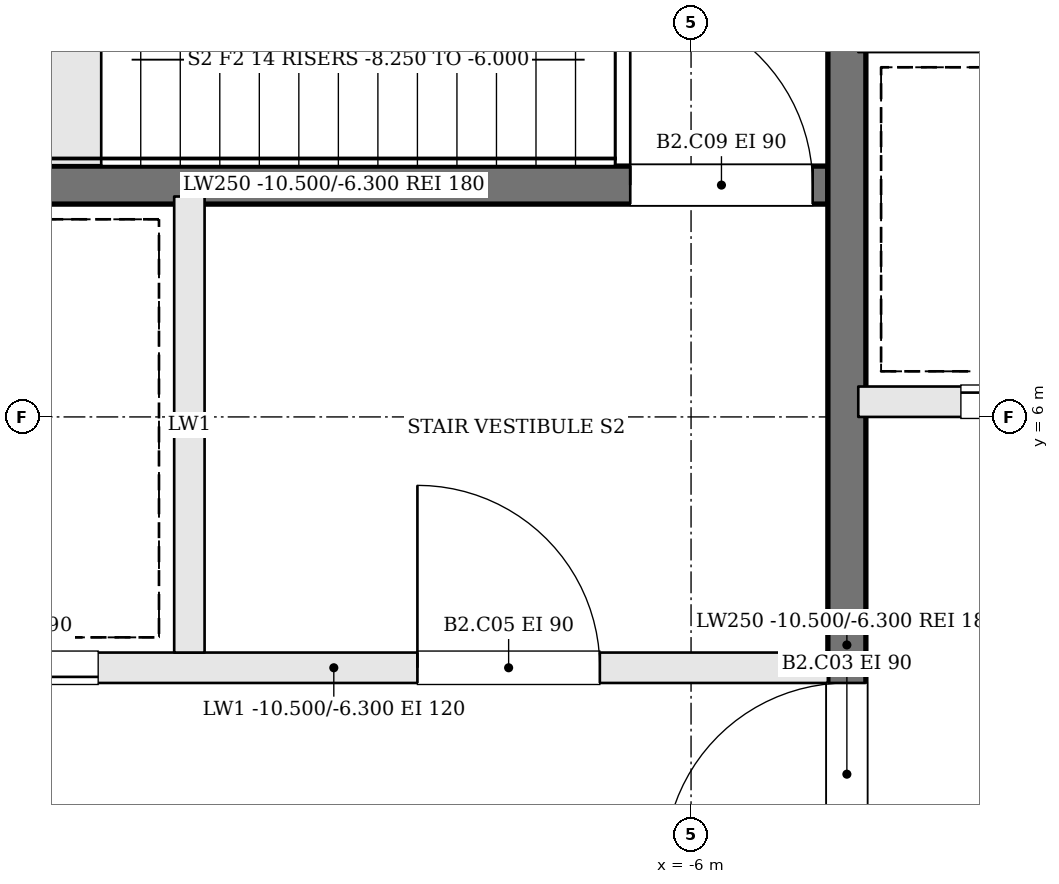
"""IFC4 building model, lengths in metres.
Left out: names, types, materials, properties, quantities, classifications, styles, units other than length and angle.
Written with IfcOpenShell. Run it as: python <this file> out.ifc"""

import sys

from ifc_helpers import new_model, si_unit, direction, frame, frame_2d, origin, place, context, subcontext, project, spatial, rectangle, extrude, element, fill, save


model = new_model("IFC4")
c1 = context("Model", 3, precision=1e-05, world=origin(), true_north=direction((0.0, 1.0)))
c2 = subcontext(c1, "Body", "Model", "MODEL_VIEW")
j1 = project(units=[si_unit("LENGTHUNIT", "METRE"), si_unit("PLANEANGLEUNIT", "RADIAN")], contexts=[c1])
p1 = place(None, origin())
s1 = spatial("IfcSite", under=j1, at=p1, CompositionType="ELEMENT")
p2 = place(p1, origin())
s2 = spatial("IfcBuilding", under=s1, at=p2, CompositionType="ELEMENT")
p3 = place(p2, frame((0.0, 0.0, -10.5)))
s3 = spatial("IfcBuildingStorey", under=s2, at=p3, CompositionType="ELEMENT", Elevation=-10.5)
p4 = place(p3, frame((-11.6, 4.35, 0.0), z_axis=(0.0, 0.0, 1.0), x_axis=(1.0, 0.0, 0.0)))
e1 = element("IfcWall", 1, at=p4, inside=s3, PredefinedType="SOLIDWALL", context=c2, shape_type="SweptSolid", body=[
    extrude(rectangle(XDim=6.5, YDim=0.2, at=frame_2d((3.25, 0.0))), origin(), (0.0, 0.0, 1.0), 4.2),
])
p5 = place(p4, frame((3.8, 0.0, 0.0)))
e2 = element("IfcOpeningElement", 2, at=p5, cuts=e1, PredefinedType="OPENING", context=c2, shape_type="SweptSolid", body=[
    extrude(rectangle(XDim=1.2, YDim=2.1, at=frame_2d((0.6, 1.05))), frame((0.0, 0.11, 0.0), z_axis=(0.0, -1.0, 0.0), x_axis=(1.0, 0.0, 0.0)), (0.0, 0.0, 1.0), 0.22),
])
p6 = place(p4, frame((0.5, 0.0, 0.0)))
e3 = element("IfcOpeningElement", 3, at=p6, cuts=e1, PredefinedType="OPENING", context=c2, shape_type="SweptSolid", body=[
    extrude(rectangle(XDim=1.2, YDim=2.1, at=frame_2d((0.6, 1.05))), frame((0.0, 0.11, 0.0), z_axis=(0.0, -1.0, 0.0), x_axis=(1.0, 0.0, 0.0)), (0.0, 0.0, 1.0), 0.22),
])
p7 = place(p3, frame((-11.6, 7.525, 0.0), z_axis=(0.0, 0.0, 1.0), x_axis=(1.0, 0.0, 0.0)))
e4 = element("IfcWall", 4, at=p7, inside=s3, PredefinedType="SOLIDWALL", context=c2, shape_type="SweptSolid", body=[
    extrude(rectangle(XDim=6.5, YDim=0.25, at=frame_2d((3.25, 0.0))), origin(), (0.0, 0.0, 1.0), 4.2),
])
p8 = place(p7, frame((5.2, 0.0, 0.0)))
e5 = element("IfcOpeningElement", 5, at=p8, cuts=e4, PredefinedType="OPENING", context=c2, shape_type="SweptSolid", body=[
    extrude(rectangle(XDim=1.2, YDim=2.1, at=frame_2d((0.6, 1.05))), frame((0.0, 0.135, 0.0), z_axis=(0.0, -1.0, 0.0), x_axis=(1.0, 0.0, 0.0)), (0.0, 0.0, 1.0), 0.27),
])
p9 = place(p3, frame((-9.3, 4.45, 0.0), z_axis=(0.0, 0.0, 1.0), x_axis=(0.0, 1.0, 0.0)))
e6 = element("IfcWall", 6, at=p9, inside=s3, PredefinedType="SOLIDWALL", context=c2, shape_type="SweptSolid", body=[
    extrude(rectangle(XDim=3.0, YDim=0.2, at=frame_2d((1.5, 0.0))), origin(), (0.0, 0.0, 1.0), 4.2),
])
p10 = place(p3, frame((-4.975, -1.6, 0.0), z_axis=(0.0, 0.0, 1.0), x_axis=(0.0, 1.0, 0.0)))
e7 = element("IfcWall", 7, at=p10, inside=s3, PredefinedType="SOLIDWALL", context=c2, shape_type="SweptSolid", body=[
    extrude(rectangle(XDim=12.2, YDim=0.25, at=frame_2d((6.1, 0.0))), origin(), (0.0, 0.0, 1.0), 4.2),
])
p11 = place(p10, frame((4.65, 0.0, 0.0)))
e8 = element("IfcOpeningElement", 8, at=p11, cuts=e7, PredefinedType="OPENING", context=c2, shape_type="SweptSolid", body=[
    extrude(rectangle(XDim=1.2, YDim=2.1, at=frame_2d((0.6, 1.05))), frame((0.0, 0.135, 0.0), z_axis=(0.0, -1.0, 0.0), x_axis=(1.0, 0.0, 0.0)), (0.0, 0.0, 1.0), 0.27),
])
p12 = place(p3, frame((-4.9, 6.1, 0.0), z_axis=(0.0, 0.0, 1.0), x_axis=(1.0, 0.0, 0.0)))
e9 = element("IfcWall", 9, at=p12, inside=s3, PredefinedType="SOLIDWALL", context=c2, shape_type="SweptSolid", body=[
    extrude(rectangle(XDim=9.8, YDim=0.2, at=frame_2d((4.9, 0.0))), origin(), (0.0, 0.0, 1.0), 4.2),
])
p13 = place(p12, frame((0.675, 0.0, 0.0)))
e10 = element("IfcOpeningElement", 10, at=p13, cuts=e9, PredefinedType="OPENING", context=c2, shape_type="SweptSolid", body=[
    extrude(rectangle(XDim=1.1, YDim=2.1, at=frame_2d((0.55, 1.05))), frame((0.0, 0.11, 0.0), z_axis=(0.0, -1.0, 0.0), x_axis=(1.0, 0.0, 0.0)), (0.0, 0.0, 1.0), 0.22),
])
p14 = place(p12, frame((3.125, 0.0, 0.0)))
e11 = element("IfcOpeningElement", 11, at=p14, cuts=e9, PredefinedType="OPENING", context=c2, shape_type="SweptSolid", body=[
    extrude(rectangle(XDim=1.1, YDim=2.1, at=frame_2d((0.55, 1.05))), frame((0.0, 0.11, 0.0), z_axis=(0.0, -1.0, 0.0), x_axis=(1.0, 0.0, 0.0)), (0.0, 0.0, 1.0), 0.22),
])
p15 = place(p12, frame((5.575, 0.0, 0.0)))
e12 = element("IfcOpeningElement", 12, at=p15, cuts=e9, PredefinedType="OPENING", context=c2, shape_type="SweptSolid", body=[
    extrude(rectangle(XDim=1.1, YDim=2.1, at=frame_2d((0.55, 1.05))), frame((0.0, 0.11, 0.0), z_axis=(0.0, -1.0, 0.0), x_axis=(1.0, 0.0, 0.0)), (0.0, 0.0, 1.0), 0.22),
])
p16 = place(p12, frame((8.025, 0.0, 0.0)))
e13 = element("IfcOpeningElement", 13, at=p16, cuts=e9, PredefinedType="OPENING", context=c2, shape_type="SweptSolid", body=[
    extrude(rectangle(XDim=1.1, YDim=2.1, at=frame_2d((0.55, 1.05))), frame((0.0, 0.11, 0.0), z_axis=(0.0, -1.0, 0.0), x_axis=(1.0, 0.0, 0.0)), (0.0, 0.0, 1.0), 0.22),
])
p17 = place(p11, origin())
e14 = element("IfcDoor", 14, at=p17, inside=s3, OperationType="SINGLE_SWING_LEFT", PredefinedType="DOOR", context=c2, shape_type="SweptSolid", body=[
    extrude(rectangle(XDim=1.2, YDim=2.1, at=frame_2d((0.6, 1.05))), frame((0.0, 0.025, 0.0), z_axis=(0.0, -1.0, 0.0), x_axis=(1.0, 0.0, 0.0)), (0.0, 0.0, 1.0), 0.05),
])
fill(e8, e14)
p18 = place(p5, origin())
e15 = element("IfcDoor", 15, at=p18, inside=s3, OperationType="SINGLE_SWING_LEFT", PredefinedType="DOOR", context=c2, shape_type="SweptSolid", body=[
    extrude(rectangle(XDim=1.2, YDim=2.1, at=frame_2d((0.6, 1.05))), frame((0.0, 0.025, 0.0), z_axis=(0.0, -1.0, 0.0), x_axis=(1.0, 0.0, 0.0)), (0.0, 0.0, 1.0), 0.05),
])
fill(e2, e15)
p19 = place(p8, origin())
e16 = element("IfcDoor", 16, at=p19, inside=s3, OperationType="SINGLE_SWING_LEFT", PredefinedType="DOOR", context=c2, shape_type="SweptSolid", body=[
    extrude(rectangle(XDim=1.2, YDim=2.1, at=frame_2d((0.6, 1.05))), frame((0.0, 0.025, 0.0), z_axis=(0.0, -1.0, 0.0), x_axis=(1.0, 0.0, 0.0)), (0.0, 0.0, 1.0), 0.05),
])
fill(e5, e16)
p20 = place(p6, origin())
e17 = element("IfcDoor", 17, at=p20, inside=s3, OperationType="SLIDING_TO_RIGHT", PredefinedType="DOOR", context=c2, shape_type="SweptSolid", body=[
    extrude(rectangle(XDim=1.2, YDim=2.1, at=frame_2d((0.6, 1.05))), frame((0.0, 0.025, 0.0), z_axis=(0.0, -1.0, 0.0), x_axis=(1.0, 0.0, 0.0)), (0.0, 0.0, 1.0), 0.05),
])
fill(e3, e17)
p21 = place(p13, origin())
e18 = element("IfcDoor", 18, at=p21, inside=s3, OperationType="SLIDING_TO_RIGHT", PredefinedType="DOOR", context=c2, shape_type="SweptSolid", body=[
    extrude(rectangle(XDim=1.1, YDim=2.1, at=frame_2d((0.55, 1.05))), frame((0.0, 0.025, 0.0), z_axis=(0.0, -1.0, 0.0), x_axis=(1.0, 0.0, 0.0)), (0.0, 0.0, 1.0), 0.05),
])
fill(e10, e18)
save(model, sys.argv[1])
